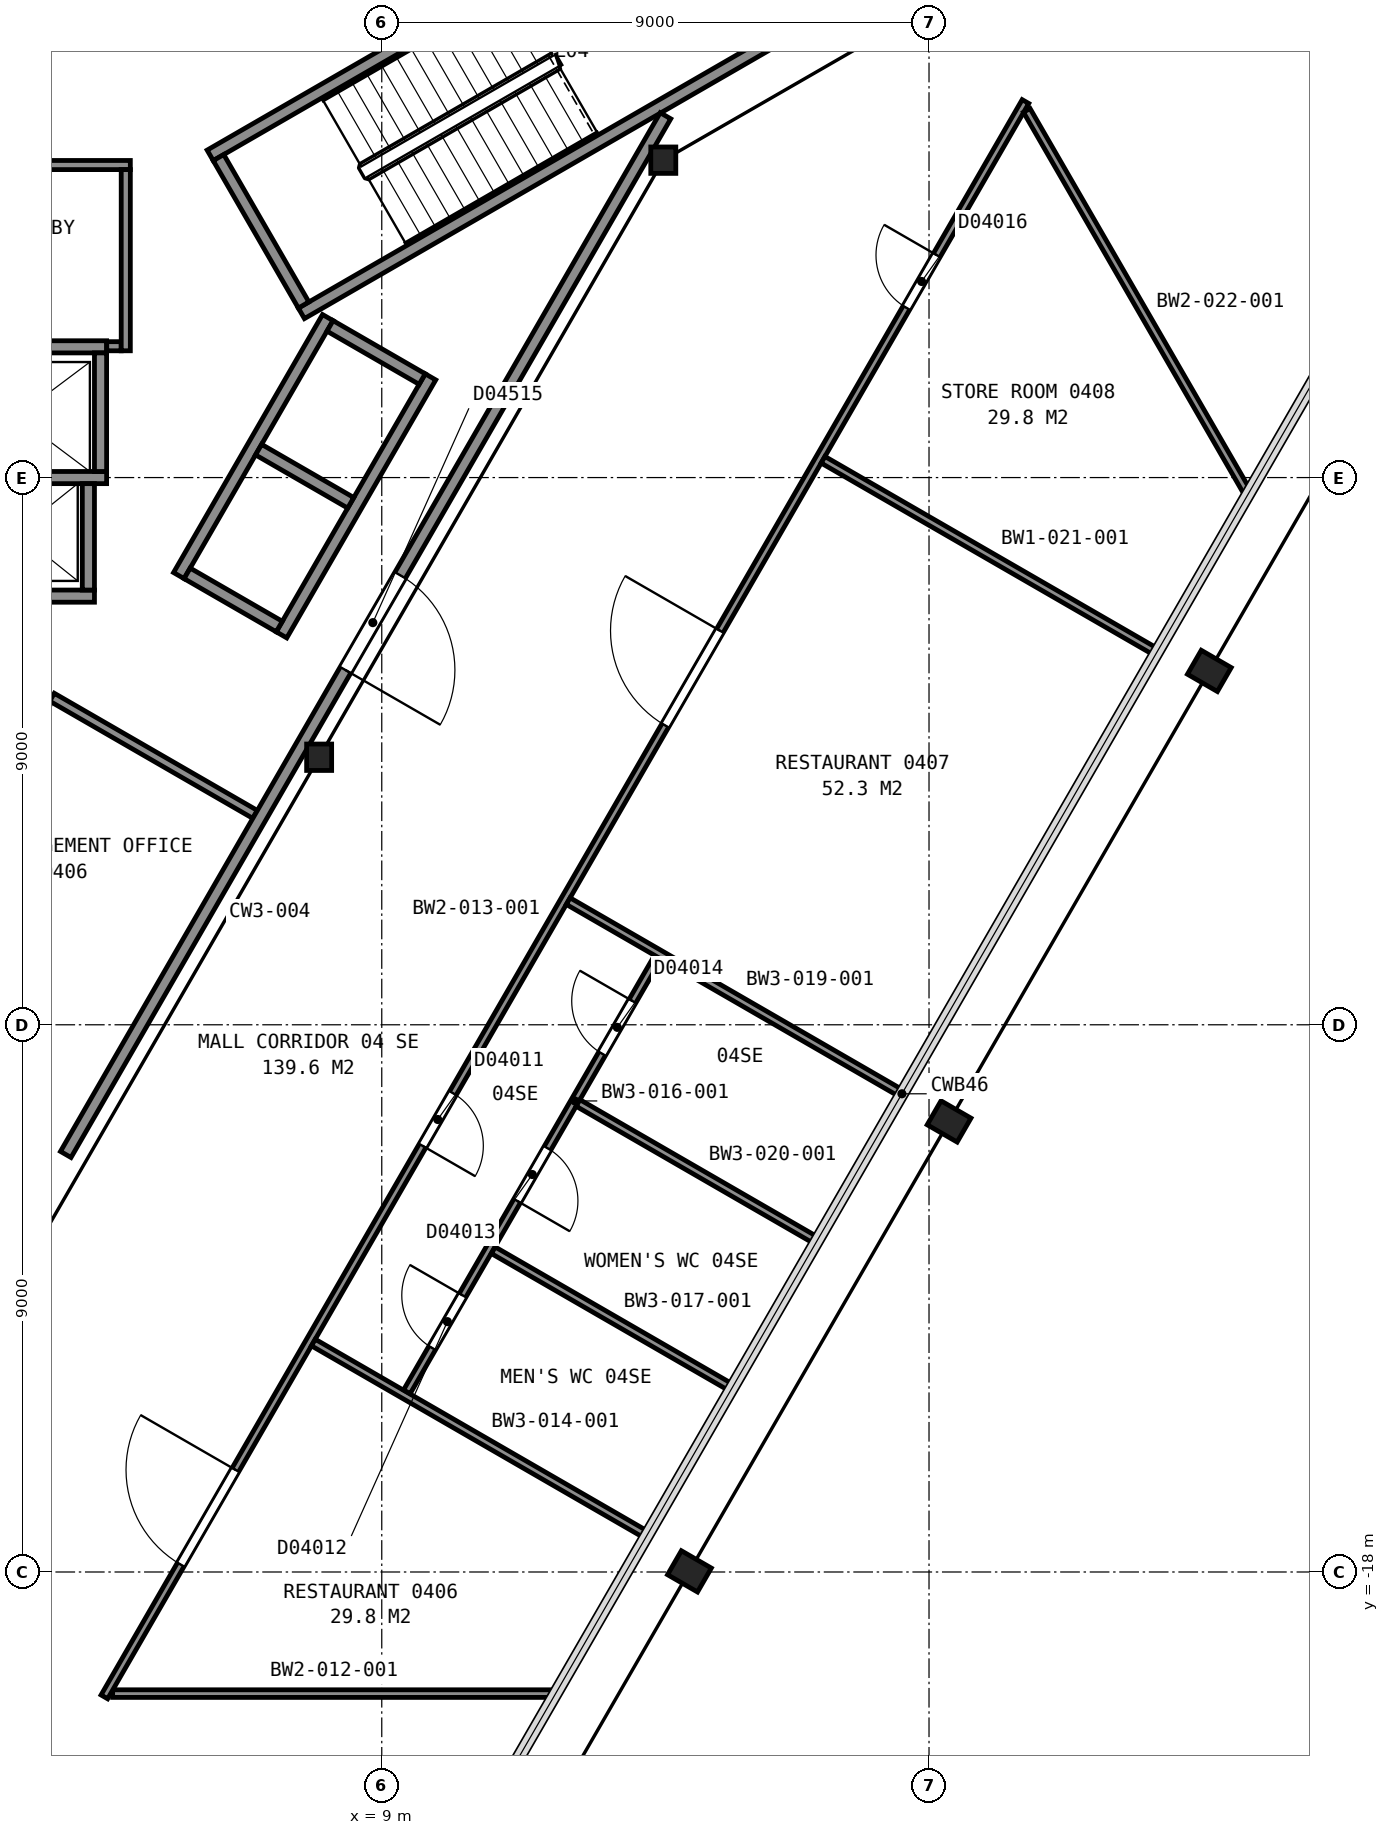
"""IFC4 building model, lengths in metres.
Left out: names, types, materials, properties, quantities, classifications, styles, units other than length and angle.
Written with IfcOpenShell. Run it as: python <this file> out.ifc"""

import sys

from ifc_helpers import new_model, si_unit, direction, frame, frame_2d, origin, origin_2d, place, context, subcontext, project, spatial, rectangle, i_section, extrude, element, fill, save


model = new_model("IFC4")
c1 = context("Model", 3, precision=1e-05, world=origin(), true_north=direction((0.0, 1.0)))
c2 = subcontext(c1, "Body", "Model", "MODEL_VIEW")
j1 = project(units=[si_unit("LENGTHUNIT", "METRE"), si_unit("PLANEANGLEUNIT", "RADIAN")], contexts=[c1])
p1 = place(None, origin())
s1 = spatial("IfcSite", under=j1, at=p1, CompositionType="ELEMENT")
p2 = place(p1, origin())
s2 = spatial("IfcBuilding", under=s1, at=p2, CompositionType="ELEMENT")
p3 = place(p2, frame((0.0, 0.0, 27.2)))
s3 = spatial("IfcBuildingStorey", under=s2, at=p3, CompositionType="ELEMENT", Elevation=27.2)
for number, where, z_axis, x_axis in (
    (1, (14.06, -17.99, 0.0), (0.0, 0.0, 1.0), (-0.5, -0.866, 0.0)),
    (2, (18.33, -10.59, 0.0), (0.0, 0.0, 1.0), (-0.5, -0.866, 0.0)),
    (3, (22.61, -3.18, 0.0), (0.0, 0.0, 1.0), (-0.5, -0.866, 0.0)),
):
    element("IfcColumn", number, at=place(p3, frame(where, z_axis=z_axis, x_axis=x_axis)), inside=s3, PredefinedType="COLUMN", context=c2, shape_type="SweptSolid", body=[
        extrude(i_section(OverallWidth=0.455, OverallDepth=0.569, WebThickness=0.078, FlangeThickness=0.125, FilletRadius=0.015, at=origin_2d()), origin(), (0.0, 0.0, 1.0), 4.775),
    ])
for number, where, z_axis, x_axis in (
    (4, (13.63, 5.22, 0.0), (0.0, 0.0, 1.0), (1.0, 0.0, 0.0)),
    (5, (7.97, -4.6, 0.0), (0.0, 0.0, 1.0), (1.0, 0.0, 0.0)),
):
    element("IfcColumn", number, at=place(p3, frame(where, z_axis=z_axis, x_axis=x_axis)), inside=s3, PredefinedType="COLUMN", context=c2, shape_type="SweptSolid", body=[
        extrude(i_section(OverallWidth=0.411, OverallDepth=0.434, WebThickness=0.036, FlangeThickness=0.057, FilletRadius=0.015, at=origin_2d()), origin(), (0.0, 0.0, 1.0), 4.8),
    ])
for number, where, z_axis, x_axis in (
    (6, (6.178, 5.299, 0.0), (0.0, 0.0, 1.0), (0.866, 0.5, 0.0)),
    (7, (7.678, 2.701, 0.0), (0.0, 0.0, 1.0), (0.866, 0.5, 0.0)),
):
    element("IfcWall", number, at=place(p3, frame(where, z_axis=z_axis, x_axis=x_axis)), inside=s3, PredefinedType="PARTITIONING", context=c2, shape_type="SweptSolid", body=[
        extrude(rectangle(XDim=12.0, YDim=0.2, at=frame_2d((6.0, 0.0))), origin(), (0.0, 0.0, 1.0), 4.55),
    ])
p4 = place(p3, frame((7.715, 2.838, 0.0), z_axis=(0.0, 0.0, 1.0), x_axis=(-0.500049511043, 0.865996816683, 0.0)))
e8 = element("IfcWall", 8, at=p4, inside=s3, PredefinedType="PARTITIONING", context=c2, shape_type="SweptSolid", body=[
    extrude(rectangle(XDim=2.8, YDim=0.2, at=frame_2d((1.4, 0.0))), origin(), (0.0, 0.0, 1.0), 4.55),
])
p5 = place(p3, frame((1.725, -1.95, 0.0), z_axis=(0.0, 0.0, 1.0), x_axis=(1.0, 0.0, 0.0)))
e9 = element("IfcWall", 9, at=p5, inside=s3, PredefinedType="PARTITIONING", context=c2, shape_type="SweptSolid", body=[
    extrude(rectangle(XDim=2.55, YDim=0.2, at=frame_2d((1.275, 0.0))), origin(), (0.0, 0.0, 1.0), 4.8),
])
p6 = place(p5, frame((0.725, 0.0, 0.0)))
e10 = element("IfcOpeningElement", 10, at=p6, cuts=e9, PredefinedType="OPENING", context=c2, shape_type="SweptSolid", body=[
    extrude(rectangle(XDim=1.1, YDim=2.1, at=frame_2d((0.55, 1.05))), frame((0.0, 0.11, 0.0), z_axis=(0.0, -1.0, 0.0), x_axis=(1.0, 0.0, 0.0)), (0.0, 0.0, 1.0), 0.22),
])
p7 = place(p3, frame((1.525, 0.0, 0.0), z_axis=(0.0, 0.0, 1.0), x_axis=(1.0, 0.0, 0.0)))
e11 = element("IfcWall", 11, at=p7, inside=s3, PredefinedType="PARTITIONING", context=c2, shape_type="SweptSolid", body=[
    extrude(rectangle(XDim=2.95, YDim=0.2, at=frame_2d((1.475, 0.0))), origin(), (0.0, 0.0, 1.0), 4.8),
])
p8 = place(p3, frame((1.525, 2.15, 0.0), z_axis=(0.0, 0.0, 1.0), x_axis=(1.0, 0.0, 0.0)))
e12 = element("IfcWall", 12, at=p8, inside=s3, PredefinedType="PARTITIONING", context=c2, shape_type="SweptSolid", body=[
    extrude(rectangle(XDim=2.95, YDim=0.2, at=frame_2d((1.475, 0.0))), origin(), (0.0, 0.0, 1.0), 4.8),
])
p9 = place(p8, frame((0.925, 0.0, 0.0)))
e13 = element("IfcOpeningElement", 13, at=p9, cuts=e12, PredefinedType="OPENING", context=c2, shape_type="SweptSolid", body=[
    extrude(rectangle(XDim=1.1, YDim=2.1, at=frame_2d((0.55, 1.05))), frame((0.0, 0.11, 0.0), z_axis=(0.0, -1.0, 0.0), x_axis=(1.0, 0.0, 0.0)), (0.0, 0.0, 1.0), 0.22),
])
p10 = place(p3, frame((7.351, -2.587, 0.0), z_axis=(0.0, 0.0, 1.0), x_axis=(0.500002801628, 0.866023786258, 0.0)))
e14 = element("IfcWall", 14, at=p10, inside=s3, PredefinedType="PARTITIONING", context=c2, shape_type="SweptSolid", body=[
    extrude(rectangle(XDim=4.9, YDim=0.2, at=frame_2d((2.45, 0.0))), origin(), (0.0, 0.0, 1.0), 4.8),
])
p11 = place(p3, frame((5.663, -1.612, 0.0), z_axis=(0.0, 0.0, 1.0), x_axis=(0.49998122708, 0.866036242063, 0.0)))
e15 = element("IfcWall", 15, at=p11, inside=s3, PredefinedType="PARTITIONING", context=c2, shape_type="SweptSolid", body=[
    extrude(rectangle(XDim=4.9, YDim=0.2, at=frame_2d((2.45, 0.0))), origin(), (0.0, 0.0, 1.0), 4.8),
])
p12 = place(p3, frame((4.375, 0.1, 0.0), z_axis=(0.0, 0.0, 1.0), x_axis=(0.0, 1.0, 0.0)))
e16 = element("IfcWall", 16, at=p12, inside=s3, PredefinedType="PARTITIONING", context=c2, shape_type="SweptSolid", body=[
    extrude(rectangle(XDim=1.95, YDim=0.2, at=frame_2d((0.975, 0.0))), origin(), (0.0, 0.0, 1.0), 4.8),
])
p13 = place(p3, frame((4.175, -1.85, 0.0), z_axis=(0.0, 0.0, 1.0), x_axis=(0.0, 1.0, 0.0)))
e17 = element("IfcWall", 17, at=p13, inside=s3, PredefinedType="PARTITIONING", context=c2, shape_type="SweptSolid", body=[
    extrude(rectangle(XDim=1.75, YDim=0.2, at=frame_2d((0.875, 0.0))), origin(), (0.0, 0.0, 1.0), 4.8),
])
p14 = place(p3, frame((9.665, 1.62, 0.0), z_axis=(0.0, 0.0, 1.0), x_axis=(-0.866002029911, 0.500040482552, 0.0)))
e18 = element("IfcWall", 18, at=p14, inside=s3, PredefinedType="PARTITIONING", context=c2, shape_type="SweptSolid", body=[
    extrude(rectangle(XDim=1.75, YDim=0.2, at=frame_2d((0.875, 0.0))), origin(), (0.0, 0.0, 1.0), 4.8),
])
for number, where, z_axis, x_axis in (
    (19, (8.49, -0.416, 0.0), (0.0, 0.0, 1.0), (-0.866, 0.5, 0.0)),
    (20, (7.315, -2.451, 0.0), (0.0, 0.0, 1.0), (-0.866, 0.5, 0.0)),
):
    element("IfcWall", number, at=place(p3, frame(where, z_axis=z_axis, x_axis=x_axis)), inside=s3, PredefinedType="PARTITIONING", context=c2, shape_type="SweptSolid", body=[
        extrude(rectangle(XDim=1.75, YDim=0.2, at=frame_2d((0.875, 0.0))), origin(), (0.0, 0.0, 1.0), 4.8),
    ])
p15 = place(p3, frame((-0.245, 5.14, 0.0), z_axis=(0.0, 0.0, 1.0), x_axis=(1.0, 0.0, 0.0)))
e21 = element("IfcWall", 21, at=p15, inside=s3, PredefinedType="PARTITIONING", context=c2, shape_type="SweptSolid", body=[
    extrude(rectangle(XDim=5.11, YDim=0.15, at=frame_2d((2.555, 0.0))), origin(), (0.0, 0.0, 1.0), 4.55),
])
p16 = place(p15, frame((1.975, 0.0, 0.0)))
e22 = element("IfcOpeningElement", 22, at=p16, cuts=e21, PredefinedType="OPENING", context=c2, shape_type="SweptSolid", body=[
    extrude(rectangle(XDim=1.0, YDim=2.1, at=frame_2d((0.5, 1.05))), frame((0.0, 0.085, 0.0), z_axis=(0.0, -1.0, 0.0), x_axis=(1.0, 0.0, 0.0)), (0.0, 0.0, 1.0), 0.17),
])
p17 = place(p3, frame((3.577, -3.613, 0.0), z_axis=(0.0, 0.0, 1.0), x_axis=(0.866080151888, -0.499905161512, 0.0)))
e23 = element("IfcWall", 23, at=p17, inside=s3, PredefinedType="PARTITIONING", context=c2, shape_type="SweptSolid", body=[
    extrude(rectangle(XDim=3.856, YDim=0.15, at=frame_2d((1.928, 0.0))), origin(), (0.0, 0.0, 1.0), 4.55),
])
p18 = place(p3, frame((3.803, -11.133, 0.0), z_axis=(0.0, 0.0, 1.0), x_axis=(0.499995287022, 0.866028124807, 0.0)))
e24 = element("IfcWall", 24, at=p18, inside=s3, PredefinedType="PARTITIONING", context=c2, shape_type="SweptSolid", body=[
    extrude(rectangle(XDim=19.726, YDim=0.2, at=frame_2d((9.863, 0.0))), origin(), (0.0, 0.0, 1.0), 4.55),
])
p19 = place(p18, frame((9.2, 0.0, 0.0)))
e25 = element("IfcOpeningElement", 25, at=p19, cuts=e24, PredefinedType="OPENING", context=c2, shape_type="SweptSolid", body=[
    extrude(rectangle(XDim=1.8, YDim=2.1, at=frame_2d((0.9, 1.05))), frame((0.0, 0.11, 0.0), z_axis=(0.0, -1.0, 0.0), x_axis=(1.0, 0.0, 0.0)), (0.0, 0.0, 1.0), 0.22),
])
p20 = place(p3, frame((4.477, 2.16, 0.0), z_axis=(0.0, 0.0, 1.0), x_axis=(1.0, 0.0, 0.0)))
e26 = element("IfcWall", 26, at=p20, inside=s3, PredefinedType="PARTITIONING", context=c2, shape_type="SweptSolid", body=[
    extrude(rectangle(XDim=0.238, YDim=0.15, at=frame_2d((0.119, 0.0))), origin(), (0.0, 0.0, 1.0), 4.55),
])
p21 = place(p3, frame((4.79, 2.085, 0.0), z_axis=(0.0, 0.0, 1.0), x_axis=(0.0, 1.0, 0.0)))
e27 = element("IfcWall", 27, at=p21, inside=s3, PredefinedType="PARTITIONING", context=c2, shape_type="SweptSolid", body=[
    extrude(rectangle(XDim=2.98, YDim=0.15, at=frame_2d((1.49, 0.0))), origin(), (0.0, 0.0, 1.0), 4.55),
])
p22 = place(p3, frame((4.574, -20.0, 0.0), z_axis=(0.0, 0.0, 1.0), x_axis=(1.0, 0.0, 0.0)))
e28 = element("IfcWall", 28, at=p22, inside=s3, PredefinedType="PARTITIONING", context=c2, shape_type="SweptSolid", body=[
    extrude(rectangle(XDim=7.285, YDim=0.125, at=frame_2d((3.643, 0.0))), origin(), (0.0, 0.0, 1.0), 4.64),
])
p23 = place(p3, frame((19.586, 6.184, 0.0), z_axis=(0.0, 0.0, 1.0), x_axis=(-0.499994028088, -0.866028851642, 0.0)))
e29 = element("IfcWall", 29, at=p23, inside=s3, PredefinedType="PARTITIONING", context=c2, shape_type="SweptSolid", body=[
    extrude(rectangle(XDim=30.297, YDim=0.125, at=frame_2d((15.148, 0.0))), origin(), (0.0, 0.0, 1.0), 3.653),
])
p24 = place(p23, frame((25.985, 0.0, 0.0)))
e30 = element("IfcOpeningElement", 30, at=p24, cuts=e29, PredefinedType="OPENING", context=c2, shape_type="SweptSolid", body=[
    extrude(rectangle(XDim=1.8, YDim=2.4, at=frame_2d((0.9, 1.2))), frame((0.0, 0.073, 0.0), z_axis=(0.0, -1.0, 0.0), x_axis=(1.0, 0.0, 0.0)), (0.0, 0.0, 1.0), 0.145),
])
p25 = place(p23, frame((18.832, 0.0, 0.0)))
e31 = element("IfcOpeningElement", 31, at=p25, cuts=e29, PredefinedType="OPENING", context=c2, shape_type="SweptSolid", body=[
    extrude(rectangle(XDim=1.0, YDim=2.1, at=frame_2d((0.5, 1.05))), frame((0.0, 0.073, 0.0), z_axis=(0.0, -1.0, 0.0), x_axis=(1.0, 0.0, 0.0)), (0.0, 0.0, 1.0), 0.145),
])
p26 = place(p23, frame((10.049, 0.0, 0.0)))
e32 = element("IfcOpeningElement", 32, at=p26, cuts=e29, PredefinedType="OPENING", context=c2, shape_type="SweptSolid", body=[
    extrude(rectangle(XDim=1.8, YDim=2.4, at=frame_2d((0.9, 1.2))), frame((0.0, 0.073, 0.0), z_axis=(0.0, -1.0, 0.0), x_axis=(1.0, 0.0, 0.0)), (0.0, 0.0, 1.0), 0.145),
])
p27 = place(p23, frame((2.917, 0.0, 0.0)))
e33 = element("IfcOpeningElement", 33, at=p27, cuts=e29, PredefinedType="OPENING", context=c2, shape_type="SweptSolid", body=[
    extrude(rectangle(XDim=1.0, YDim=2.1, at=frame_2d((0.5, 1.05))), frame((0.0, 0.073, 0.0), z_axis=(0.0, -1.0, 0.0), x_axis=(1.0, 0.0, 0.0)), (0.0, 0.0, 1.0), 0.145),
])
p28 = place(p3, frame((7.875, -14.226, 0.0), z_axis=(0.0, 0.0, 1.0), x_axis=(0.866003371142, -0.500038159714, 0.0)))
e34 = element("IfcWall", 34, at=p28, inside=s3, PredefinedType="PARTITIONING", context=c2, shape_type="SweptSolid", body=[
    extrude(rectangle(XDim=6.337, YDim=0.125, at=frame_2d((3.168, 0.0))), origin(), (0.0, 0.0, 1.0), 3.653),
])
p29 = place(p3, frame((13.54, -7.889, 0.0), z_axis=(0.0, 0.0, 1.0), x_axis=(-0.500033134207, -0.866006272896, 0.0)))
e35 = element("IfcWall", 35, at=p29, inside=s3, PredefinedType="PARTITIONING", context=c2, shape_type="SweptSolid", body=[
    extrude(rectangle(XDim=8.253, YDim=0.125, at=frame_2d((4.127, 0.0))), origin(), (0.0, 0.0, 1.0), 4.64),
])
p30 = place(p29, frame((6.421, 0.0, 0.0)))
e36 = element("IfcOpeningElement", 36, at=p30, cuts=e35, PredefinedType="OPENING", context=c2, shape_type="SweptSolid", body=[
    extrude(rectangle(XDim=1.0, YDim=2.1, at=frame_2d((0.5, 1.05))), frame((0.0, 0.073, 0.0), z_axis=(0.0, -1.0, 0.0), x_axis=(1.0, 0.0, 0.0)), (0.0, 0.0, 1.0), 0.145),
])
p31 = place(p29, frame((3.627, 0.0, 0.0)))
e37 = element("IfcOpeningElement", 37, at=p31, cuts=e35, PredefinedType="OPENING", context=c2, shape_type="SweptSolid", body=[
    extrude(rectangle(XDim=1.0, YDim=2.1, at=frame_2d((0.5, 1.05))), frame((0.0, 0.073, 0.0), z_axis=(0.0, -1.0, 0.0), x_axis=(1.0, 0.0, 0.0)), (0.0, 0.0, 1.0), 0.145),
])
p32 = place(p29, frame((0.832, 0.0, 0.0)))
e38 = element("IfcOpeningElement", 38, at=p32, cuts=e35, PredefinedType="OPENING", context=c2, shape_type="SweptSolid", body=[
    extrude(rectangle(XDim=1.0, YDim=2.1, at=frame_2d((0.5, 1.05))), frame((0.0, 0.073, 0.0), z_axis=(0.0, -1.0, 0.0), x_axis=(1.0, 0.0, 0.0)), (0.0, 0.0, 1.0), 0.145),
])
p33 = place(p3, frame((10.834, -12.709, 0.0), z_axis=(0.0, 0.0, 1.0), x_axis=(0.866030417568, -0.499991315771, 0.0)))
e39 = element("IfcWall", 39, at=p33, inside=s3, PredefinedType="PARTITIONING", context=c2, shape_type="SweptSolid", body=[
    extrude(rectangle(XDim=4.533, YDim=0.125, at=frame_2d((2.266, 0.0))), origin(), (0.0, 0.0, 1.0), 4.64),
])
p34 = place(p3, frame((12.066, -6.966, 0.0), z_axis=(0.0, 0.0, 1.0), x_axis=(0.86604189602, -0.499971433522, 0.0)))
e40 = element("IfcWall", 40, at=p34, inside=s3, PredefinedType="PARTITIONING", context=c2, shape_type="SweptSolid", body=[
    extrude(rectangle(XDim=6.338, YDim=0.125, at=frame_2d((3.169, 0.0))), origin(), (0.0, 0.0, 1.0), 3.653),
])
p35 = place(p3, frame((12.228, -10.286, 0.0), z_axis=(0.0, 0.0, 1.0), x_axis=(0.866009042838, -0.50002833692, 0.0)))
e41 = element("IfcWall", 41, at=p35, inside=s3, PredefinedType="PARTITIONING", context=c2, shape_type="SweptSolid", body=[
    extrude(rectangle(XDim=4.537, YDim=0.125, at=frame_2d((2.269, 0.0))), origin(), (0.0, 0.0, 1.0), 4.64),
])
p36 = place(p3, frame((16.257, 0.293, 0.0), z_axis=(0.0, 0.0, 1.0), x_axis=(0.866118237319, -0.499839173118, 0.0)))
e42 = element("IfcWall", 42, at=p36, inside=s3, PredefinedType="PARTITIONING", context=c2, shape_type="SweptSolid", body=[
    extrude(rectangle(XDim=6.337, YDim=0.125, at=frame_2d((3.169, 0.0))), origin(), (0.0, 0.0, 1.0), 3.653),
])
p37 = place(p3, frame((19.607, 6.039, 0.0), z_axis=(0.0, 0.0, 1.0), x_axis=(0.500002873931, -0.866023744513, 0.0)))
e43 = element("IfcWall", 43, at=p37, inside=s3, PredefinedType="PARTITIONING", context=c2, shape_type="SweptSolid", body=[
    extrude(rectangle(XDim=7.285, YDim=0.125, at=frame_2d((3.643, 0.0))), origin(), (0.0, 0.0, 1.0), 4.64),
])
p38 = place(p19, origin())
e44 = element("IfcDoor", 44, at=p38, inside=s3, OperationType="DOUBLE_DOOR_SINGLE_SWING", PredefinedType="DOOR", context=c2, shape_type="SweptSolid", body=[
    extrude(rectangle(XDim=1.8, YDim=2.1, at=frame_2d((0.9, 1.05))), frame((0.0, 0.025, 0.0), z_axis=(0.0, -1.0, 0.0), x_axis=(1.0, 0.0, 0.0)), (0.0, 0.0, 1.0), 0.05),
])
fill(e25, e44)
p39 = place(p24, origin())
e45 = element("IfcDoor", 45, at=p39, inside=s3, OperationType="DOUBLE_DOOR_SINGLE_SWING", PredefinedType="DOOR", context=c2, shape_type="SweptSolid", body=[
    extrude(rectangle(XDim=1.8, YDim=2.4, at=frame_2d((0.9, 1.2))), frame((0.0, 0.025, 0.0), z_axis=(0.0, -1.0, 0.0), x_axis=(1.0, 0.0, 0.0)), (0.0, 0.0, 1.0), 0.05),
])
fill(e30, e45)
p40 = place(p25, origin())
e46 = element("IfcDoor", 46, at=p40, inside=s3, OperationType="SINGLE_SWING_RIGHT", PredefinedType="DOOR", context=c2, shape_type="SweptSolid", body=[
    extrude(rectangle(XDim=1.0, YDim=2.1, at=frame_2d((0.5, 1.05))), frame((0.0, 0.025, 0.0), z_axis=(0.0, -1.0, 0.0), x_axis=(1.0, 0.0, 0.0)), (0.0, 0.0, 1.0), 0.05),
])
fill(e31, e46)
p41 = place(p26, origin())
e47 = element("IfcDoor", 47, at=p41, inside=s3, OperationType="DOUBLE_DOOR_SINGLE_SWING", PredefinedType="DOOR", context=c2, shape_type="SweptSolid", body=[
    extrude(rectangle(XDim=1.8, YDim=2.4, at=frame_2d((0.9, 1.2))), frame((0.0, 0.025, 0.0), z_axis=(0.0, -1.0, 0.0), x_axis=(1.0, 0.0, 0.0)), (0.0, 0.0, 1.0), 0.05),
])
fill(e32, e47)
p42 = place(p27, origin())
e48 = element("IfcDoor", 48, at=p42, inside=s3, OperationType="SINGLE_SWING_LEFT", PredefinedType="DOOR", context=c2, shape_type="SweptSolid", body=[
    extrude(rectangle(XDim=1.0, YDim=2.1, at=frame_2d((0.5, 1.05))), frame((0.0, 0.025, 0.0), z_axis=(0.0, -1.0, 0.0), x_axis=(1.0, 0.0, 0.0)), (0.0, 0.0, 1.0), 0.05),
])
fill(e33, e48)
p43 = place(p30, origin())
e49 = element("IfcDoor", 49, at=p43, inside=s3, OperationType="SINGLE_SWING_LEFT", PredefinedType="DOOR", context=c2, shape_type="SweptSolid", body=[
    extrude(rectangle(XDim=1.0, YDim=2.1, at=frame_2d((0.5, 1.05))), frame((0.0, 0.025, 0.0), z_axis=(0.0, -1.0, 0.0), x_axis=(1.0, 0.0, 0.0)), (0.0, 0.0, 1.0), 0.05),
])
fill(e36, e49)
p44 = place(p31, origin())
e50 = element("IfcDoor", 50, at=p44, inside=s3, OperationType="SINGLE_SWING_RIGHT", PredefinedType="DOOR", context=c2, shape_type="SweptSolid", body=[
    extrude(rectangle(XDim=1.0, YDim=2.1, at=frame_2d((0.5, 1.05))), frame((0.0, 0.025, 0.0), z_axis=(0.0, -1.0, 0.0), x_axis=(1.0, 0.0, 0.0)), (0.0, 0.0, 1.0), 0.05),
])
fill(e37, e50)
p45 = place(p32, origin())
e51 = element("IfcDoor", 51, at=p45, inside=s3, OperationType="SINGLE_SWING_LEFT", PredefinedType="DOOR", context=c2, shape_type="SweptSolid", body=[
    extrude(rectangle(XDim=1.0, YDim=2.1, at=frame_2d((0.5, 1.05))), frame((0.0, 0.025, 0.0), z_axis=(0.0, -1.0, 0.0), x_axis=(1.0, 0.0, 0.0)), (0.0, 0.0, 1.0), 0.05),
])
fill(e38, e51)
save(model, sys.argv[1])
